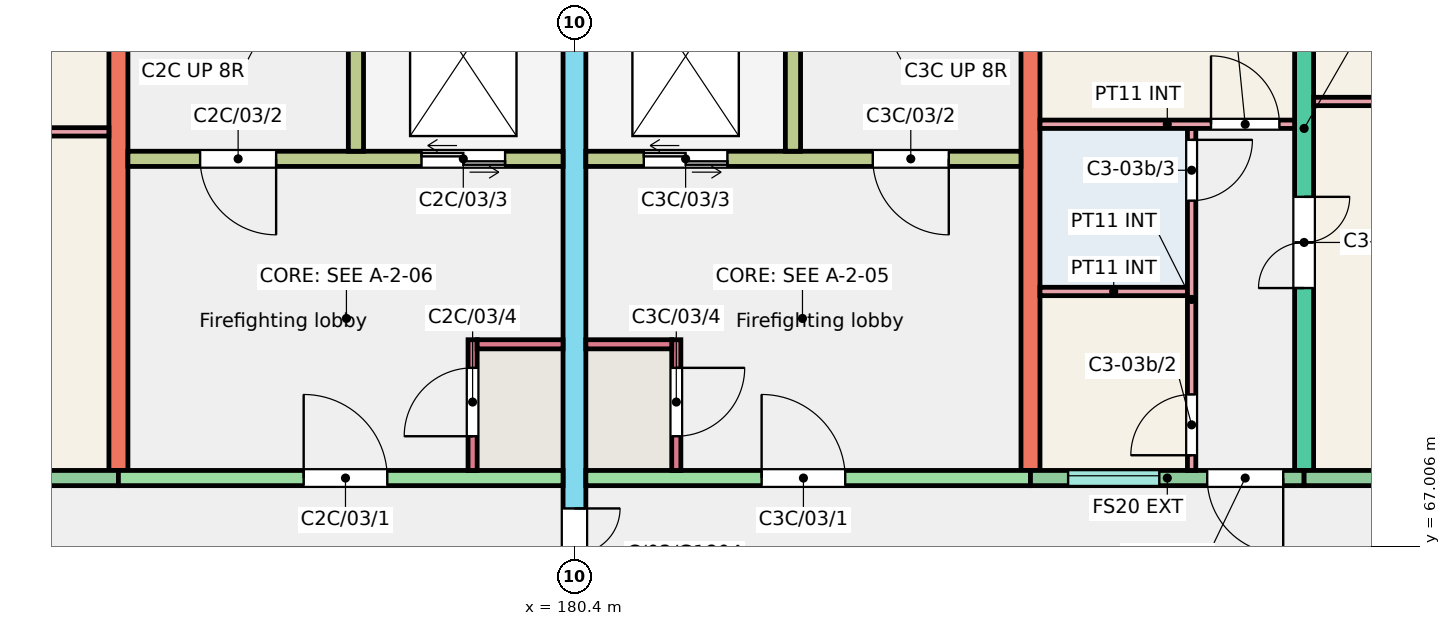
"""IFC4 building model, lengths in metres.
Left out: names, types, materials, properties, quantities, classifications, styles, units other than length and angle.
Written with IfcOpenShell. Run it as: python <this file> out.ifc"""

import sys

from ifc_helpers import new_model, si_unit, direction, frame, frame_2d, origin, place, context, subcontext, project, spatial, rectangle, extrude, element, fill, save


model = new_model("IFC4")
c1 = context("Model", 3, precision=1e-05, world=origin(), true_north=direction((0.0, 1.0)))
c2 = subcontext(c1, "Body", "Model", "MODEL_VIEW")
j1 = project(units=[si_unit("LENGTHUNIT", "METRE"), si_unit("PLANEANGLEUNIT", "RADIAN")], contexts=[c1])
p1 = place(None, origin())
s1 = spatial("IfcSite", under=j1, at=p1, CompositionType="ELEMENT")
p2 = place(p1, origin())
s2 = spatial("IfcBuilding", under=s1, at=p2, CompositionType="ELEMENT")
p3 = place(p2, frame((0.0, 0.0, 9.0)))
s3 = spatial("IfcBuildingStorey", under=s2, at=p3, CompositionType="ELEMENT", Elevation=9.0)
p4 = place(p3, frame((174.4, 68.0, 0.0), z_axis=(0.0, 0.0, 1.0), x_axis=(0.0, 1.0, 0.0)))
e1 = element("IfcWall", 1, at=p4, inside=s3, PredefinedType="SHEAR", context=c2, shape_type="SweptSolid", body=[
    extrude(rectangle(XDim=9.0, YDim=0.25, at=frame_2d((4.5, 0.0))), origin(), (0.0, 0.0, 1.0), 3.0),
])
p5 = place(p3, frame((180.4, 66.0, 0.0), z_axis=(0.0, 0.0, 1.0), x_axis=(0.0, 1.0, 0.0)))
e2 = element("IfcWall", 2, at=p5, inside=s3, PredefinedType="SHEAR", context=c2, shape_type="SweptSolid", body=[
    extrude(rectangle(XDim=11.0, YDim=0.3, at=frame_2d((5.5, 0.0))), origin(), (0.0, 0.0, 1.0), 3.0),
])
p6 = place(p5, frame((0.3, 0.0, 0.0)))
e3 = element("IfcOpeningElement", 3, at=p6, cuts=e2, PredefinedType="OPENING", context=c2, shape_type="SweptSolid", body=[
    extrude(rectangle(XDim=1.2, YDim=2.1, at=frame_2d((0.6, 1.05))), frame((0.0, 0.16, 0.0), z_axis=(0.0, -1.0, 0.0), x_axis=(1.0, 0.0, 0.0)), (0.0, 0.0, 1.0), 0.32),
])
p7 = place(p3, frame((186.4, 68.0, 0.0), z_axis=(0.0, 0.0, 1.0), x_axis=(0.0, 1.0, 0.0)))
e4 = element("IfcWall", 4, at=p7, inside=s3, PredefinedType="SHEAR", context=c2, shape_type="SweptSolid", body=[
    extrude(rectangle(XDim=9.0, YDim=0.25, at=frame_2d((4.5, 0.0))), origin(), (0.0, 0.0, 1.0), 3.0),
])
p8 = place(p3, frame((190.0, 68.0, 0.0), z_axis=(0.0, 0.0, 1.0), x_axis=(0.0, 1.0, 0.0)))
e5 = element("IfcWall", 5, at=p8, inside=s3, PredefinedType="SHEAR", context=c2, shape_type="SweptSolid", body=[
    extrude(rectangle(XDim=9.0, YDim=0.25, at=frame_2d((4.5, 0.0))), origin(), (0.0, 0.0, 1.0), 3.0),
])
p9 = place(p8, frame((2.4, 0.0, 0.0)))
e6 = element("IfcOpeningElement", 6, at=p9, cuts=e5, PredefinedType="OPENING", context=c2, shape_type="SweptSolid", body=[
    extrude(rectangle(XDim=1.2, YDim=2.1, at=frame_2d((0.6, 1.05))), frame((0.0, 0.135, 0.0), z_axis=(0.0, -1.0, 0.0), x_axis=(1.0, 0.0, 0.0)), (0.0, 0.0, 1.0), 0.27),
])
p10 = place(p8, frame((6.4, 0.0, 0.0)))
e7 = element("IfcOpeningElement", 7, at=p10, cuts=e5, PredefinedType="OPENING", context=c2, shape_type="SweptSolid", body=[
    extrude(rectangle(XDim=1.2, YDim=2.1, at=frame_2d((0.6, 1.05))), frame((0.0, 0.135, 0.0), z_axis=(0.0, -1.0, 0.0), x_axis=(1.0, 0.0, 0.0)), (0.0, 0.0, 1.0), 0.27),
])
p11 = place(p3, frame((170.8, 67.9, 0.0), z_axis=(0.0, 0.0, 1.0), x_axis=(1.0, 0.0, 0.0)))
e8 = element("IfcWall", 8, at=p11, inside=s3, PredefinedType="SOLIDWALL", context=c2, shape_type="SweptSolid", body=[
    extrude(rectangle(XDim=3.6, YDim=0.2, at=frame_2d((1.8, 0.0))), origin(), (0.0, 0.0, 1.0), 3.0),
])
p12 = place(p11, frame((1.038, 0.0, 0.9)))
e9 = element("IfcOpeningElement", 9, at=p12, cuts=e8, PredefinedType="OPENING", context=c2, shape_type="SweptSolid", body=[
    extrude(rectangle(XDim=1.5, YDim=1.5, at=frame_2d((0.75, 0.75))), frame((0.0, 0.11, 0.0), z_axis=(0.0, -1.0, 0.0), x_axis=(1.0, 0.0, 0.0)), (0.0, 0.0, 1.0), 0.22),
])
p13 = place(p3, frame((174.4, 67.9, 0.0), z_axis=(0.0, 0.0, 1.0), x_axis=(1.0, 0.0, 0.0)))
e10 = element("IfcWall", 10, at=p13, inside=s3, PredefinedType="SHEAR", context=c2, shape_type="SweptSolid", body=[
    extrude(rectangle(XDim=5.85, YDim=0.2, at=frame_2d((2.925, 0.0))), origin(), (0.0, 0.0, 1.0), 3.0),
])
p14 = place(p13, frame((2.438, 0.0, 0.0)))
e11 = element("IfcOpeningElement", 11, at=p14, cuts=e10, PredefinedType="OPENING", context=c2, shape_type="SweptSolid", body=[
    extrude(rectangle(XDim=1.1, YDim=2.1, at=frame_2d((0.55, 1.05))), frame((0.0, 0.11, 0.0), z_axis=(0.0, -1.0, 0.0), x_axis=(1.0, 0.0, 0.0)), (0.0, 0.0, 1.0), 0.22),
])
p15 = place(p3, frame((174.525, 72.1, 0.0), z_axis=(0.0, 0.0, 1.0), x_axis=(1.0, 0.0, 0.0)))
e12 = element("IfcWall", 12, at=p15, inside=s3, PredefinedType="SHEAR", context=c2, shape_type="SweptSolid", body=[
    extrude(rectangle(XDim=5.725, YDim=0.2, at=frame_2d((2.863, 0.0))), origin(), (0.0, 0.0, 1.0), 3.0),
])
p16 = place(p15, frame((0.95, 0.0, 0.0)))
e13 = element("IfcOpeningElement", 13, at=p16, cuts=e12, PredefinedType="OPENING", context=c2, shape_type="SweptSolid", body=[
    extrude(rectangle(XDim=1.0, YDim=2.1, at=frame_2d((0.5, 1.05))), frame((0.0, 0.11, 0.0), z_axis=(0.0, -1.0, 0.0), x_axis=(1.0, 0.0, 0.0)), (0.0, 0.0, 1.0), 0.22),
])
p17 = place(p15, frame((3.863, 0.0, 0.0)))
e14 = element("IfcOpeningElement", 14, at=p17, cuts=e12, PredefinedType="OPENING", context=c2, shape_type="SweptSolid", body=[
    extrude(rectangle(XDim=1.1, YDim=2.1, at=frame_2d((0.55, 1.05))), frame((0.0, 0.11, 0.0), z_axis=(0.0, -1.0, 0.0), x_axis=(1.0, 0.0, 0.0)), (0.0, 0.0, 1.0), 0.22),
])
p18 = place(p3, frame((177.525, 72.2, 0.0), z_axis=(0.0, 0.0, 1.0), x_axis=(0.0, 1.0, 0.0)))
e15 = element("IfcWall", 15, at=p18, inside=s3, PredefinedType="SHEAR", context=c2, shape_type="SweptSolid", body=[
    extrude(rectangle(XDim=4.8, YDim=0.2, at=frame_2d((2.4, 0.0))), origin(), (0.0, 0.0, 1.0), 3.0),
])
p19 = place(p3, frame((179.06, 68.0, 0.0), z_axis=(0.0, 0.0, 1.0), x_axis=(0.0, 1.0, 0.0)))
e16 = element("IfcWall", 16, at=p19, inside=s3, PredefinedType="SHEAR", context=c2, shape_type="SweptSolid", body=[
    extrude(rectangle(XDim=1.72, YDim=0.12, at=frame_2d((0.86, 0.0))), origin(), (0.0, 0.0, 1.0), 3.0),
])
p20 = place(p19, frame((0.45, 0.0, 0.0)))
e17 = element("IfcOpeningElement", 17, at=p20, cuts=e16, PredefinedType="OPENING", context=c2, shape_type="SweptSolid", body=[
    extrude(rectangle(XDim=0.9, YDim=2.1, at=frame_2d((0.45, 1.05))), frame((0.0, 0.07, 0.0), z_axis=(0.0, -1.0, 0.0), x_axis=(1.0, 0.0, 0.0)), (0.0, 0.0, 1.0), 0.14),
])
p21 = place(p3, frame((179.12, 69.66, 0.0), z_axis=(0.0, 0.0, 1.0), x_axis=(1.0, 0.0, 0.0)))
e18 = element("IfcWall", 18, at=p21, inside=s3, PredefinedType="SHEAR", context=c2, shape_type="SweptSolid", body=[
    extrude(rectangle(XDim=1.13, YDim=0.12, at=frame_2d((0.565, 0.0))), origin(), (0.0, 0.0, 1.0), 3.0),
])
p22 = place(p3, frame((180.55, 67.9, 0.0), z_axis=(0.0, 0.0, 1.0), x_axis=(1.0, 0.0, 0.0)))
e19 = element("IfcWall", 19, at=p22, inside=s3, PredefinedType="SHEAR", context=c2, shape_type="SweptSolid", body=[
    extrude(rectangle(XDim=5.85, YDim=0.2, at=frame_2d((2.925, 0.0))), origin(), (0.0, 0.0, 1.0), 3.0),
])
p23 = place(p22, frame((2.312, 0.0, 0.0)))
e20 = element("IfcOpeningElement", 20, at=p23, cuts=e19, PredefinedType="OPENING", context=c2, shape_type="SweptSolid", body=[
    extrude(rectangle(XDim=1.1, YDim=2.1, at=frame_2d((0.55, 1.05))), frame((0.0, 0.11, 0.0), z_axis=(0.0, -1.0, 0.0), x_axis=(1.0, 0.0, 0.0)), (0.0, 0.0, 1.0), 0.22),
])
p24 = place(p3, frame((180.55, 72.1, 0.0), z_axis=(0.0, 0.0, 1.0), x_axis=(1.0, 0.0, 0.0)))
e21 = element("IfcWall", 21, at=p24, inside=s3, PredefinedType="SHEAR", context=c2, shape_type="SweptSolid", body=[
    extrude(rectangle(XDim=5.725, YDim=0.2, at=frame_2d((2.862, 0.0))), origin(), (0.0, 0.0, 1.0), 3.0),
])
p25 = place(p24, frame((3.775, 0.0, 0.0)))
e22 = element("IfcOpeningElement", 22, at=p25, cuts=e21, PredefinedType="OPENING", context=c2, shape_type="SweptSolid", body=[
    extrude(rectangle(XDim=1.0, YDim=2.1, at=frame_2d((0.5, 1.05))), frame((0.0, 0.11, 0.0), z_axis=(0.0, -1.0, 0.0), x_axis=(1.0, 0.0, 0.0)), (0.0, 0.0, 1.0), 0.22),
])
p26 = place(p24, frame((0.762, 0.0, 0.0)))
e23 = element("IfcOpeningElement", 23, at=p26, cuts=e21, PredefinedType="OPENING", context=c2, shape_type="SweptSolid", body=[
    extrude(rectangle(XDim=1.1, YDim=2.1, at=frame_2d((0.55, 1.05))), frame((0.0, 0.11, 0.0), z_axis=(0.0, -1.0, 0.0), x_axis=(1.0, 0.0, 0.0)), (0.0, 0.0, 1.0), 0.22),
])
p27 = place(p3, frame((183.275, 72.2, 0.0), z_axis=(0.0, 0.0, 1.0), x_axis=(0.0, 1.0, 0.0)))
e24 = element("IfcWall", 24, at=p27, inside=s3, PredefinedType="SHEAR", context=c2, shape_type="SweptSolid", body=[
    extrude(rectangle(XDim=4.8, YDim=0.2, at=frame_2d((2.4, 0.0))), origin(), (0.0, 0.0, 1.0), 3.0),
])
p28 = place(p3, frame((181.74, 68.0, 0.0), z_axis=(0.0, 0.0, 1.0), x_axis=(0.0, 1.0, 0.0)))
e25 = element("IfcWall", 25, at=p28, inside=s3, PredefinedType="SHEAR", context=c2, shape_type="SweptSolid", body=[
    extrude(rectangle(XDim=1.72, YDim=0.12, at=frame_2d((0.86, 0.0))), origin(), (0.0, 0.0, 1.0), 3.0),
])
p29 = place(p28, frame((0.45, 0.0, 0.0)))
e26 = element("IfcOpeningElement", 26, at=p29, cuts=e25, PredefinedType="OPENING", context=c2, shape_type="SweptSolid", body=[
    extrude(rectangle(XDim=0.9, YDim=2.1, at=frame_2d((0.45, 1.05))), frame((0.0, 0.07, 0.0), z_axis=(0.0, -1.0, 0.0), x_axis=(1.0, 0.0, 0.0)), (0.0, 0.0, 1.0), 0.14),
])
p30 = place(p3, frame((180.55, 69.66, 0.0), z_axis=(0.0, 0.0, 1.0), x_axis=(1.0, 0.0, 0.0)))
e27 = element("IfcWall", 27, at=p30, inside=s3, PredefinedType="SHEAR", context=c2, shape_type="SweptSolid", body=[
    extrude(rectangle(XDim=1.13, YDim=0.12, at=frame_2d((0.565, 0.0))), origin(), (0.0, 0.0, 1.0), 3.0),
])
p31 = place(p3, frame((186.4, 67.9, 0.0), z_axis=(0.0, 0.0, 1.0), x_axis=(1.0, 0.0, 0.0)))
e28 = element("IfcWall", 28, at=p31, inside=s3, PredefinedType="SOLIDWALL", context=c2, shape_type="SweptSolid", body=[
    extrude(rectangle(XDim=3.6, YDim=0.2, at=frame_2d((1.8, 0.0))), origin(), (0.0, 0.0, 1.0), 3.0),
])
p32 = place(p31, frame((0.495, 0.0, 1.1)))
e29 = element("IfcOpeningElement", 29, at=p32, cuts=e28, PredefinedType="OPENING", context=c2, shape_type="SweptSolid", body=[
    extrude(rectangle(XDim=1.2, YDim=1.3, at=frame_2d((0.6, 0.65))), frame((0.0, 0.11, 0.0), z_axis=(0.0, -1.0, 0.0), x_axis=(1.0, 0.0, 0.0)), (0.0, 0.0, 1.0), 0.22),
])
p33 = place(p31, frame((2.325, 0.0, 0.0)))
e30 = element("IfcOpeningElement", 30, at=p33, cuts=e28, PredefinedType="OPENING", context=c2, shape_type="SweptSolid", body=[
    extrude(rectangle(XDim=1.0, YDim=2.1, at=frame_2d((0.5, 1.05))), frame((0.0, 0.11, 0.0), z_axis=(0.0, -1.0, 0.0), x_axis=(1.0, 0.0, 0.0)), (0.0, 0.0, 1.0), 0.22),
])
p34 = place(p3, frame((190.0, 67.9, 0.0), z_axis=(0.0, 0.0, 1.0), x_axis=(1.0, 0.0, 0.0)))
e31 = element("IfcWall", 31, at=p34, inside=s3, PredefinedType="SOLIDWALL", context=c2, shape_type="SweptSolid", body=[
    extrude(rectangle(XDim=3.6, YDim=0.2, at=frame_2d((1.8, 0.0))), origin(), (0.0, 0.0, 1.0), 3.0),
])
p35 = place(p34, frame((1.062, 0.0, 0.9)))
e32 = element("IfcOpeningElement", 32, at=p35, cuts=e31, PredefinedType="OPENING", context=c2, shape_type="SweptSolid", body=[
    extrude(rectangle(XDim=1.5, YDim=1.5, at=frame_2d((0.75, 0.75))), frame((0.0, 0.11, 0.0), z_axis=(0.0, -1.0, 0.0), x_axis=(1.0, 0.0, 0.0)), (0.0, 0.0, 1.0), 0.22),
])
p36 = place(p3, frame((170.9, 72.455, 0.0), z_axis=(0.0, 0.0, 1.0), x_axis=(1.0, 0.0, 0.0)))
e33 = element("IfcWall", 33, at=p36, inside=s3, PredefinedType="PARTITIONING", context=c2, shape_type="SweptSolid", body=[
    extrude(rectangle(XDim=3.375, YDim=0.11, at=frame_2d((1.688, 0.0))), origin(), (0.0, 0.0, 1.0), 2.8),
])
p37 = place(p3, frame((186.525, 70.355, 0.0), z_axis=(0.0, 0.0, 1.0), x_axis=(1.0, 0.0, 0.0)))
e34 = element("IfcWall", 34, at=p37, inside=s3, PredefinedType="PARTITIONING", context=c2, shape_type="SweptSolid", body=[
    extrude(rectangle(XDim=1.94, YDim=0.11, at=frame_2d((0.97, 0.0))), origin(), (0.0, 0.0, 1.0), 2.8),
])
p38 = place(p3, frame((188.52, 68.0, 0.0), z_axis=(0.0, 0.0, 1.0), x_axis=(0.0, 1.0, 0.0)))
e35 = element("IfcWall", 35, at=p38, inside=s3, PredefinedType="PARTITIONING", context=c2, shape_type="SweptSolid", body=[
    extrude(rectangle(XDim=4.5, YDim=0.11, at=frame_2d((2.25, 0.0))), origin(), (0.0, 0.0, 1.0), 2.8),
])
p39 = place(p38, frame((0.2, 0.0, 0.0)))
e36 = element("IfcOpeningElement", 36, at=p39, cuts=e35, PredefinedType="OPENING", context=c2, shape_type="SweptSolid", body=[
    extrude(rectangle(XDim=0.8, YDim=2.1, at=frame_2d((0.4, 1.05))), frame((0.0, 0.065, 0.0), z_axis=(0.0, -1.0, 0.0), x_axis=(1.0, 0.0, 0.0)), (0.0, 0.0, 1.0), 0.13),
])
p40 = place(p38, frame((3.55, 0.0, 0.0)))
e37 = element("IfcOpeningElement", 37, at=p40, cuts=e35, PredefinedType="OPENING", context=c2, shape_type="SweptSolid", body=[
    extrude(rectangle(XDim=0.8, YDim=2.1, at=frame_2d((0.4, 1.05))), frame((0.0, 0.065, 0.0), z_axis=(0.0, -1.0, 0.0), x_axis=(1.0, 0.0, 0.0)), (0.0, 0.0, 1.0), 0.13),
])
p41 = place(p3, frame((186.525, 72.555, 0.0), z_axis=(0.0, 0.0, 1.0), x_axis=(1.0, 0.0, 0.0)))
e38 = element("IfcWall", 38, at=p41, inside=s3, PredefinedType="PARTITIONING", context=c2, shape_type="SweptSolid", body=[
    extrude(rectangle(XDim=3.35, YDim=0.11, at=frame_2d((1.675, 0.0))), origin(), (0.0, 0.0, 1.0), 2.8),
])
p42 = place(p41, frame((2.25, 0.0, 0.0)))
e39 = element("IfcOpeningElement", 39, at=p42, cuts=e38, PredefinedType="OPENING", context=c2, shape_type="SweptSolid", body=[
    extrude(rectangle(XDim=0.9, YDim=2.1, at=frame_2d((0.45, 1.05))), frame((0.0, 0.065, 0.0), z_axis=(0.0, -1.0, 0.0), x_axis=(1.0, 0.0, 0.0)), (0.0, 0.0, 1.0), 0.13),
])
p43 = place(p3, frame((190.125, 72.855, 0.0), z_axis=(0.0, 0.0, 1.0), x_axis=(1.0, 0.0, 0.0)))
e40 = element("IfcWall", 40, at=p43, inside=s3, PredefinedType="PARTITIONING", context=c2, shape_type="SweptSolid", body=[
    extrude(rectangle(XDim=3.375, YDim=0.11, at=frame_2d((1.688, 0.0))), origin(), (0.0, 0.0, 1.0), 2.8),
])
p44 = place(p32, origin())
e41 = element("IfcWindow", 41, at=p44, inside=s3, PartitioningType="SINGLE_PANEL", PredefinedType="WINDOW", context=c2, shape_type="SweptSolid", body=[
    extrude(rectangle(XDim=1.2, YDim=1.3, at=frame_2d((0.6, 0.65))), frame((0.0, 0.06, 0.0), z_axis=(0.0, -1.0, 0.0), x_axis=(1.0, 0.0, 0.0)), (0.0, 0.0, 1.0), 0.06),
])
fill(e29, e41)
p45 = place(p33, origin())
e42 = element("IfcDoor", 42, at=p45, inside=s3, OperationType="SINGLE_SWING_RIGHT", PredefinedType="DOOR", context=c2, shape_type="SweptSolid", body=[
    extrude(rectangle(XDim=1.0, YDim=2.1, at=frame_2d((0.5, 1.05))), frame((0.0, 0.025, 0.0), z_axis=(0.0, -1.0, 0.0), x_axis=(1.0, 0.0, 0.0)), (0.0, 0.0, 1.0), 0.05),
])
fill(e30, e42)
p46 = place(p39, origin())
e43 = element("IfcDoor", 43, at=p46, inside=s3, OperationType="SINGLE_SWING_LEFT", PredefinedType="DOOR", context=c2, shape_type="SweptSolid", body=[
    extrude(rectangle(XDim=0.8, YDim=2.1, at=frame_2d((0.4, 1.05))), frame((0.0, 0.025, 0.0), z_axis=(0.0, -1.0, 0.0), x_axis=(1.0, 0.0, 0.0)), (0.0, 0.0, 1.0), 0.05),
])
fill(e36, e43)
p47 = place(p40, origin())
e44 = element("IfcDoor", 44, at=p47, inside=s3, OperationType="SINGLE_SWING_RIGHT", PredefinedType="DOOR", context=c2, shape_type="SweptSolid", body=[
    extrude(rectangle(XDim=0.8, YDim=2.1, at=frame_2d((0.4, 1.05))), frame((0.0, 0.025, 0.0), z_axis=(0.0, -1.0, 0.0), x_axis=(1.0, 0.0, 0.0)), (0.0, 0.0, 1.0), 0.05),
])
fill(e37, e44)
p48 = place(p42, origin())
e45 = element("IfcDoor", 45, at=p48, inside=s3, OperationType="SINGLE_SWING_LEFT", PredefinedType="DOOR", context=c2, shape_type="SweptSolid", body=[
    extrude(rectangle(XDim=0.9, YDim=2.1, at=frame_2d((0.45, 1.05))), frame((0.0, 0.025, 0.0), z_axis=(0.0, -1.0, 0.0), x_axis=(1.0, 0.0, 0.0)), (0.0, 0.0, 1.0), 0.05),
])
fill(e39, e45)
p49 = place(p9, origin())
e46 = element("IfcDoor", 46, at=p49, inside=s3, OperationType="DOUBLE_DOOR_SINGLE_SWING", PredefinedType="DOOR", context=c2, shape_type="SweptSolid", body=[
    extrude(rectangle(XDim=1.2, YDim=2.1, at=frame_2d((0.6, 1.05))), frame((0.0, 0.025, 0.0), z_axis=(0.0, -1.0, 0.0), x_axis=(1.0, 0.0, 0.0)), (0.0, 0.0, 1.0), 0.05),
])
fill(e6, e46)
p50 = place(p14, origin())
e47 = element("IfcDoor", 47, at=p50, inside=s3, OperationType="SINGLE_SWING_LEFT", PredefinedType="DOOR", context=c2, shape_type="SweptSolid", body=[
    extrude(rectangle(XDim=1.1, YDim=2.1, at=frame_2d((0.55, 1.05))), frame((0.0, 0.025, 0.0), z_axis=(0.0, -1.0, 0.0), x_axis=(1.0, 0.0, 0.0)), (0.0, 0.0, 1.0), 0.05),
])
fill(e11, e47)
p51 = place(p16, origin())
e48 = element("IfcDoor", 48, at=p51, inside=s3, OperationType="SINGLE_SWING_RIGHT", PredefinedType="DOOR", context=c2, shape_type="SweptSolid", body=[
    extrude(rectangle(XDim=1.0, YDim=2.1, at=frame_2d((0.5, 1.05))), frame((0.0, 0.025, 0.0), z_axis=(0.0, -1.0, 0.0), x_axis=(1.0, 0.0, 0.0)), (0.0, 0.0, 1.0), 0.05),
])
fill(e13, e48)
p52 = place(p17, origin())
e49 = element("IfcDoor", 49, at=p52, inside=s3, OperationType="DOUBLE_DOOR_SLIDING", PredefinedType="DOOR", context=c2, shape_type="SweptSolid", body=[
    extrude(rectangle(XDim=1.1, YDim=2.1, at=frame_2d((0.55, 1.05))), frame((0.0, 0.025, 0.0), z_axis=(0.0, -1.0, 0.0), x_axis=(1.0, 0.0, 0.0)), (0.0, 0.0, 1.0), 0.05),
])
fill(e14, e49)
p53 = place(p20, origin())
e50 = element("IfcDoor", 50, at=p53, inside=s3, OperationType="SINGLE_SWING_LEFT", PredefinedType="DOOR", context=c2, shape_type="SweptSolid", body=[
    extrude(rectangle(XDim=0.9, YDim=2.1, at=frame_2d((0.45, 1.05))), frame((0.0, 0.025, 0.0), z_axis=(0.0, -1.0, 0.0), x_axis=(1.0, 0.0, 0.0)), (0.0, 0.0, 1.0), 0.05),
])
fill(e17, e50)
p54 = place(p23, origin())
e51 = element("IfcDoor", 51, at=p54, inside=s3, OperationType="SINGLE_SWING_LEFT", PredefinedType="DOOR", context=c2, shape_type="SweptSolid", body=[
    extrude(rectangle(XDim=1.1, YDim=2.1, at=frame_2d((0.55, 1.05))), frame((0.0, 0.025, 0.0), z_axis=(0.0, -1.0, 0.0), x_axis=(1.0, 0.0, 0.0)), (0.0, 0.0, 1.0), 0.05),
])
fill(e20, e51)
p55 = place(p25, origin())
e52 = element("IfcDoor", 52, at=p55, inside=s3, OperationType="SINGLE_SWING_RIGHT", PredefinedType="DOOR", context=c2, shape_type="SweptSolid", body=[
    extrude(rectangle(XDim=1.0, YDim=2.1, at=frame_2d((0.5, 1.05))), frame((0.0, 0.025, 0.0), z_axis=(0.0, -1.0, 0.0), x_axis=(1.0, 0.0, 0.0)), (0.0, 0.0, 1.0), 0.05),
])
fill(e22, e52)
p56 = place(p26, origin())
e53 = element("IfcDoor", 53, at=p56, inside=s3, OperationType="DOUBLE_DOOR_SLIDING", PredefinedType="DOOR", context=c2, shape_type="SweptSolid", body=[
    extrude(rectangle(XDim=1.1, YDim=2.1, at=frame_2d((0.55, 1.05))), frame((0.0, 0.025, 0.0), z_axis=(0.0, -1.0, 0.0), x_axis=(1.0, 0.0, 0.0)), (0.0, 0.0, 1.0), 0.05),
])
fill(e23, e53)
p57 = place(p29, origin())
e54 = element("IfcDoor", 54, at=p57, inside=s3, OperationType="SINGLE_SWING_RIGHT", PredefinedType="DOOR", context=c2, shape_type="SweptSolid", body=[
    extrude(rectangle(XDim=0.9, YDim=2.1, at=frame_2d((0.45, 1.05))), frame((0.0, 0.025, 0.0), z_axis=(0.0, -1.0, 0.0), x_axis=(1.0, 0.0, 0.0)), (0.0, 0.0, 1.0), 0.05),
])
fill(e26, e54)
p58 = place(p6, origin())
e55 = element("IfcDoor", 55, at=p58, inside=s3, OperationType="DOUBLE_DOOR_SINGLE_SWING", PredefinedType="DOOR", context=c2, shape_type="SweptSolid", body=[
    extrude(rectangle(XDim=1.2, YDim=2.1, at=frame_2d((0.6, 1.05))), frame((0.0, 0.025, 0.0), z_axis=(0.0, -1.0, 0.0), x_axis=(1.0, 0.0, 0.0)), (0.0, 0.0, 1.0), 0.05),
])
fill(e3, e55)
save(model, sys.argv[1])
